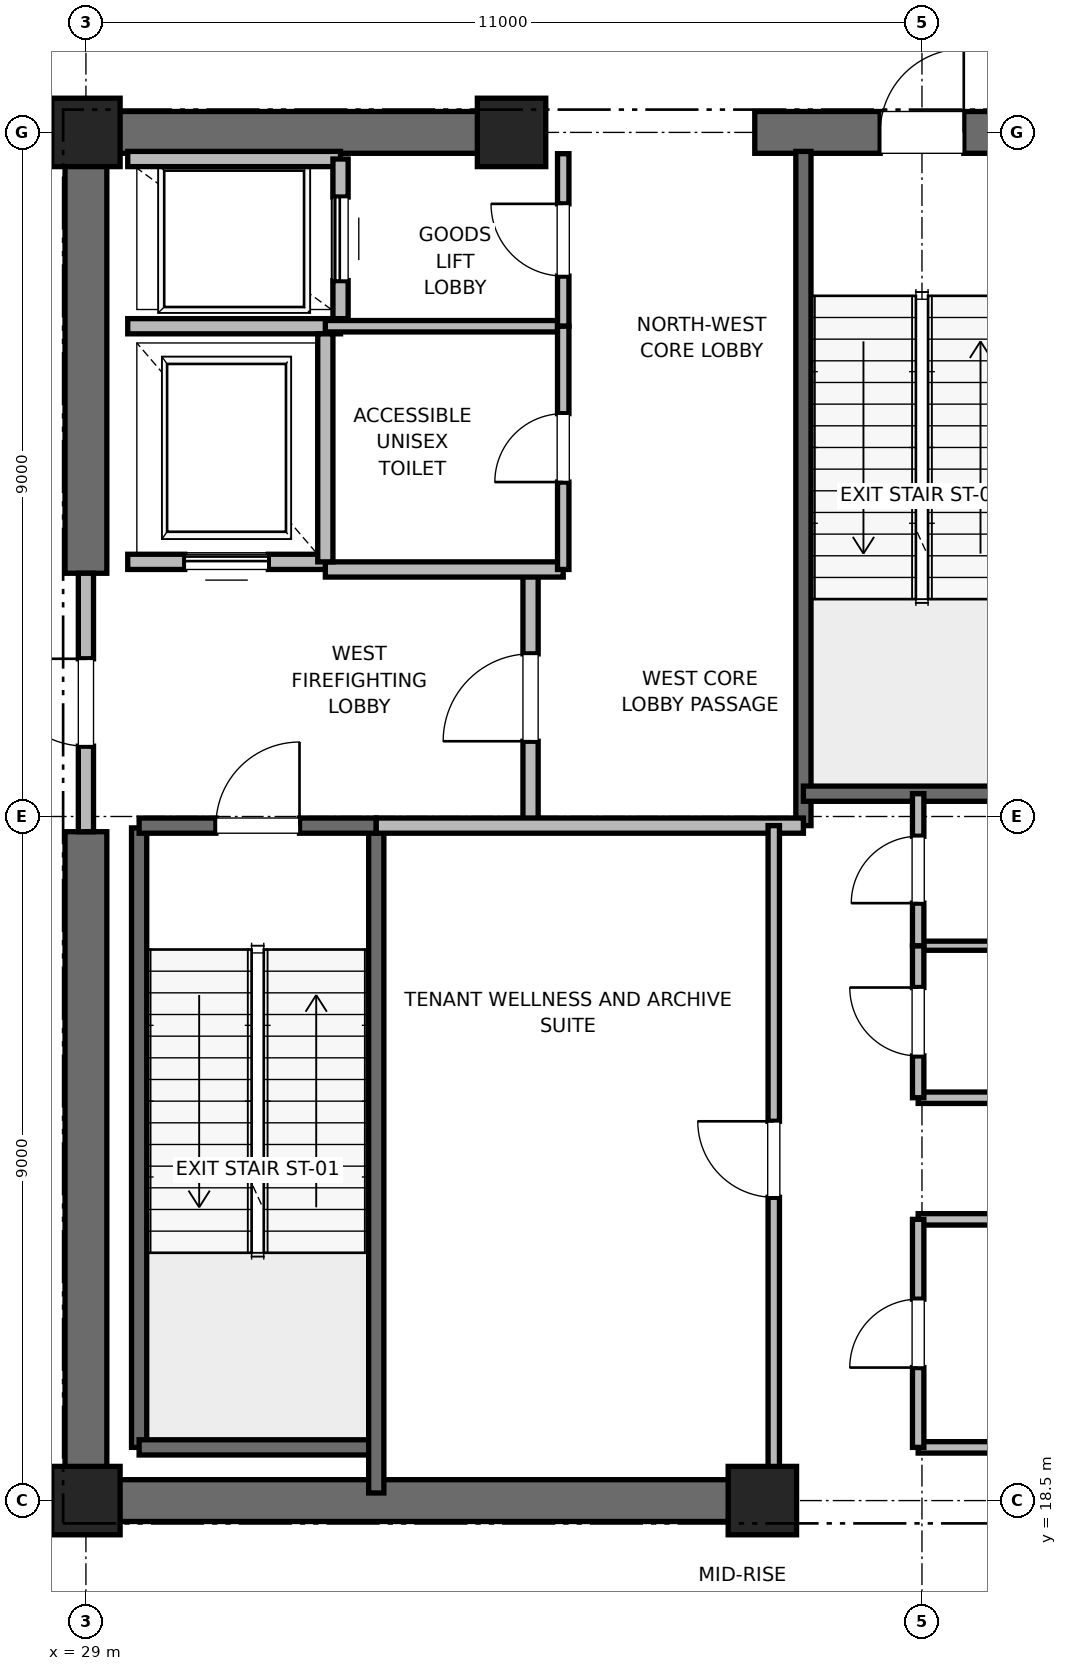
"""IFC4 building model, lengths in metres.
Left out: names, types, materials, properties, quantities, classifications, styles, units other than length and angle.
Written with IfcOpenShell. Run it as: python <this file> out.ifc"""

import sys

from ifc_helpers import new_model, si_unit, direction, frame, frame_2d, origin, origin_2d, place, context, subcontext, project, spatial, rectangle, extrude, element, fill, save


model = new_model("IFC4")
c1 = context("Model", 3, precision=1e-05, world=origin(), true_north=direction((0.0, 1.0)))
c2 = subcontext(c1, "Body", "Model", "MODEL_VIEW")
j1 = project(units=[si_unit("LENGTHUNIT", "METRE"), si_unit("PLANEANGLEUNIT", "RADIAN")], contexts=[c1])
p1 = place(None, origin())
s1 = spatial("IfcSite", under=j1, at=p1, CompositionType="ELEMENT")
p2 = place(p1, origin())
s2 = spatial("IfcBuilding", under=s1, at=p2, CompositionType="ELEMENT")
p3 = place(p2, frame((0.0, 0.0, 200.2)))
s3 = spatial("IfcBuildingStorey", under=s2, at=p3, CompositionType="ELEMENT", Elevation=200.2)
for number, where, z_axis, x_axis in (
    (1, (29.0, 18.5, 0.0), (0.0, 0.0, 1.0), (1.0, 0.0, 0.0)),
    (2, (29.0, 36.5, 0.0), (0.0, 0.0, 1.0), (1.0, 0.0, 0.0)),
    (3, (37.9, 18.5, 0.0), (0.0, 0.0, 1.0), (1.0, 0.0, 0.0)),
    (4, (34.6, 36.5, 0.0), (0.0, 0.0, 1.0), (1.0, 0.0, 0.0)),
):
    element("IfcColumn", number, at=place(p3, frame(where, z_axis=z_axis, x_axis=x_axis)), inside=s3, PredefinedType="PILASTER", context=c2, shape_type="SweptSolid", body=[
        extrude(rectangle(XDim=0.9, YDim=0.9, at=origin_2d()), origin(), (0.0, 0.0, 1.0), 5.0),
    ])
p4 = place(p3, frame((29.0, 18.5, 0.0), z_axis=(0.0, 0.0, 1.0), x_axis=(1.0, 0.0, 0.0)))
e5 = element("IfcWall", 5, at=p4, inside=s3, PredefinedType="SHEAR", context=c2, shape_type="SweptSolid", body=[
    extrude(rectangle(XDim=9.2, YDim=0.55, at=frame_2d((4.6, 0.0))), origin(), (0.0, 0.0, 1.0), 4.775),
])
p5 = place(p3, frame((29.0, 36.5, 0.0), z_axis=(0.0, 0.0, 1.0), x_axis=(1.0, 0.0, 0.0)))
e6 = element("IfcWall", 6, at=p5, inside=s3, PredefinedType="SHEAR", context=c2, shape_type="SweptSolid", body=[
    extrude(rectangle(XDim=5.8, YDim=0.55, at=frame_2d((2.9, 0.0))), origin(), (0.0, 0.0, 1.0), 4.775),
])
p6 = place(p3, frame((37.8, 36.5, 0.0), z_axis=(0.0, 0.0, 1.0), x_axis=(1.0, 0.0, 0.0)))
e7 = element("IfcWall", 7, at=p6, inside=s3, PredefinedType="SHEAR", context=c2, shape_type="SweptSolid", body=[
    extrude(rectangle(XDim=4.4, YDim=0.55, at=frame_2d((2.2, 0.0))), origin(), (0.0, 0.0, 1.0), 4.775),
])
p7 = place(p6, frame((1.65, 0.0, 0.0)))
e8 = element("IfcOpeningElement", 8, at=p7, cuts=e7, PredefinedType="OPENING", context=c2, shape_type="SweptSolid", body=[
    extrude(rectangle(XDim=1.1, YDim=2.15, at=frame_2d((0.55, 1.075))), frame((0.0, 0.275, 0.0), z_axis=(0.0, -1.0, 0.0), x_axis=(1.0, 0.0, 0.0)), (0.0, 0.0, 1.0), 0.55),
])
p8 = place(p3, frame((29.0, 18.5, 0.0), z_axis=(0.0, 0.0, 1.0), x_axis=(0.0, 1.0, 0.0)))
e9 = element("IfcWall", 9, at=p8, inside=s3, PredefinedType="SHEAR", context=c2, shape_type="SweptSolid", body=[
    extrude(rectangle(XDim=8.8, YDim=0.55, at=frame_2d((4.4, 0.0))), origin(), (0.0, 0.0, 1.0), 4.775),
])
p9 = place(p3, frame((29.0, 30.7, 0.0), z_axis=(0.0, 0.0, 1.0), x_axis=(0.0, 1.0, 0.0)))
e10 = element("IfcWall", 10, at=p9, inside=s3, PredefinedType="SHEAR", context=c2, shape_type="SweptSolid", body=[
    extrude(rectangle(XDim=5.8, YDim=0.55, at=frame_2d((2.9, 0.0))), origin(), (0.0, 0.0, 1.0), 4.775),
])
p10 = place(p3, frame((29.7, 19.2, 0.0), z_axis=(0.0, 0.0, 1.0), x_axis=(0.0, 1.0, 0.0)))
e11 = element("IfcWall", 11, at=p10, inside=s3, PredefinedType="SOLIDWALL", context=c2, shape_type="SweptSolid", body=[
    extrude(rectangle(XDim=8.15, YDim=0.2, at=frame_2d((4.075, 0.0))), origin(), (0.0, 0.0, 1.0), 4.775),
])
p11 = place(p3, frame((29.7, 19.2, 0.0), z_axis=(0.0, 0.0, 1.0), x_axis=(1.0, 0.0, 0.0)))
e12 = element("IfcWall", 12, at=p11, inside=s3, PredefinedType="SOLIDWALL", context=c2, shape_type="SweptSolid", body=[
    extrude(rectangle(XDim=3.12, YDim=0.2, at=frame_2d((1.56, 0.0))), origin(), (0.0, 0.0, 1.0), 4.775),
])
p12 = place(p3, frame((32.82, 18.6, 0.0), z_axis=(0.0, 0.0, 1.0), x_axis=(0.0, 1.0, 0.0)))
e13 = element("IfcWall", 13, at=p12, inside=s3, PredefinedType="SOLIDWALL", context=c2, shape_type="SweptSolid", body=[
    extrude(rectangle(XDim=8.78, YDim=0.2, at=frame_2d((4.39, 0.0))), origin(), (0.0, 0.0, 1.0), 4.775),
])
p13 = place(p3, frame((29.7, 27.38, 0.0), z_axis=(0.0, 0.0, 1.0), x_axis=(1.0, 0.0, 0.0)))
e14 = element("IfcWall", 14, at=p13, inside=s3, PredefinedType="SOLIDWALL", context=c2, shape_type="SweptSolid", body=[
    extrude(rectangle(XDim=3.12, YDim=0.2, at=frame_2d((1.56, 0.0))), origin(), (0.0, 0.0, 1.0), 4.775),
])
p14 = place(p13, frame((1.01, 0.0, 0.0)))
e15 = element("IfcOpeningElement", 15, at=p14, cuts=e14, PredefinedType="OPENING", context=c2, shape_type="SweptSolid", body=[
    extrude(rectangle(XDim=1.1, YDim=2.15, at=frame_2d((0.55, 1.075))), frame((0.0, 0.1, 0.0), z_axis=(0.0, -1.0, 0.0), x_axis=(1.0, 0.0, 0.0)), (0.0, 0.0, 1.0), 0.2),
])
p15 = place(p3, frame((38.44, 27.38, 0.0), z_axis=(0.0, 0.0, 1.0), x_axis=(0.0, 1.0, 0.0)))
e16 = element("IfcWall", 16, at=p15, inside=s3, PredefinedType="SOLIDWALL", context=c2, shape_type="SweptSolid", body=[
    extrude(rectangle(XDim=8.87, YDim=0.2, at=frame_2d((4.435, 0.0))), origin(), (0.0, 0.0, 1.0), 4.775),
])
p16 = place(p3, frame((38.44, 27.8, 0.0), z_axis=(0.0, 0.0, 1.0), x_axis=(1.0, 0.0, 0.0)))
e17 = element("IfcWall", 17, at=p16, inside=s3, PredefinedType="SOLIDWALL", context=c2, shape_type="SweptSolid", body=[
    extrude(rectangle(XDim=3.32, YDim=0.2, at=frame_2d((1.66, 0.0))), origin(), (0.0, 0.0, 1.0), 4.775),
])
p17 = place(p3, frame((34.85, 27.38, 0.0), z_axis=(0.0, 0.0, 1.0), x_axis=(0.0, 1.0, 0.0)))
e18 = element("IfcWall", 18, at=p17, inside=s3, PredefinedType="PARTITIONING", context=c2, shape_type="SweptSolid", body=[
    extrude(rectangle(XDim=3.37, YDim=0.2, at=frame_2d((1.685, 0.0))), origin(), (0.0, 0.0, 1.0), 4.775),
])
p18 = place(p17, frame((1.11, 0.0, 0.0)))
e19 = element("IfcOpeningElement", 19, at=p18, cuts=e18, PredefinedType="OPENING", context=c2, shape_type="SweptSolid", body=[
    extrude(rectangle(XDim=1.15, YDim=2.2, at=frame_2d((0.575, 1.1))), frame((0.0, 0.1, 0.0), z_axis=(0.0, -1.0, 0.0), x_axis=(1.0, 0.0, 0.0)), (0.0, 0.0, 1.0), 0.2),
])
p19 = place(p3, frame((29.0, 27.3, 0.0), z_axis=(0.0, 0.0, 1.0), x_axis=(0.0, 1.0, 0.0)))
e20 = element("IfcWall", 20, at=p19, inside=s3, PredefinedType="PARTITIONING", context=c2, shape_type="SweptSolid", body=[
    extrude(rectangle(XDim=3.4, YDim=0.2, at=frame_2d((1.7, 0.0))), origin(), (0.0, 0.0, 1.0), 3.755),
])
p20 = place(p19, frame((1.125, 0.0, 0.0)))
e21 = element("IfcOpeningElement", 21, at=p20, cuts=e20, PredefinedType="OPENING", context=c2, shape_type="SweptSolid", body=[
    extrude(rectangle(XDim=1.15, YDim=2.2, at=frame_2d((0.575, 1.1))), frame((0.0, 0.1, 0.0), z_axis=(0.0, -1.0, 0.0), x_axis=(1.0, 0.0, 0.0)), (0.0, 0.0, 1.0), 0.2),
])
p21 = place(p3, frame((32.82, 27.38, 0.0), z_axis=(0.0, 0.0, 1.0), x_axis=(1.0, 0.0, 0.0)))
e22 = element("IfcWall", 22, at=p21, inside=s3, PredefinedType="PARTITIONING", context=c2, shape_type="SweptSolid", body=[
    extrude(rectangle(XDim=5.62, YDim=0.2, at=frame_2d((2.81, 0.0))), origin(), (0.0, 0.0, 1.0), 4.775),
])
p22 = place(p3, frame((32.15, 30.75, 0.0), z_axis=(0.0, 0.0, 1.0), x_axis=(1.0, 0.0, 0.0)))
e23 = element("IfcWall", 23, at=p22, inside=s3, PredefinedType="PARTITIONING", context=c2, shape_type="SweptSolid", body=[
    extrude(rectangle(XDim=3.13, YDim=0.2, at=frame_2d((1.565, 0.0))), origin(), (0.0, 0.0, 1.0), 4.775),
])
p23 = place(p3, frame((29.55, 30.85, 0.0), z_axis=(0.0, 0.0, 1.0), x_axis=(1.0, 0.0, 0.0)))
e24 = element("IfcWall", 24, at=p23, inside=s3, PredefinedType="SOLIDWALL", context=c2, shape_type="SweptSolid", body=[
    extrude(rectangle(XDim=2.6, YDim=0.2, at=frame_2d((1.3, 0.0))), origin(), (0.0, 0.0, 1.0), 3.755),
])
p24 = place(p23, frame((0.75, 0.0, 0.0)))
e25 = element("IfcOpeningElement", 25, at=p24, cuts=e24, PredefinedType="OPENING", context=c2, shape_type="SweptSolid", body=[
    extrude(rectangle(XDim=1.1, YDim=2.2, at=frame_2d((0.55, 1.1))), frame((0.0, 0.1, 0.0), z_axis=(0.0, -1.0, 0.0), x_axis=(1.0, 0.0, 0.0)), (0.0, 0.0, 1.0), 0.2),
])
p25 = place(p3, frame((29.55, 33.95, 0.0), z_axis=(0.0, 0.0, 1.0), x_axis=(1.0, 0.0, 0.0)))
e26 = element("IfcWall", 26, at=p25, inside=s3, PredefinedType="SOLIDWALL", context=c2, shape_type="SweptSolid", body=[
    extrude(rectangle(XDim=2.8, YDim=0.2, at=frame_2d((1.4, 0.0))), origin(), (0.0, 0.0, 1.0), 4.775),
])
p26 = place(p3, frame((32.15, 30.85, 0.0), z_axis=(0.0, 0.0, 1.0), x_axis=(0.0, 1.0, 0.0)))
e27 = element("IfcWall", 27, at=p26, inside=s3, PredefinedType="SOLIDWALL", context=c2, shape_type="SweptSolid", body=[
    extrude(rectangle(XDim=3.0, YDim=0.2, at=frame_2d((1.5, 0.0))), origin(), (0.0, 0.0, 1.0), 4.775),
])
p27 = place(p3, frame((32.35, 36.15, 0.0), z_axis=(0.0, 0.0, 1.0), x_axis=(-1.0, 0.0, 0.0)))
e28 = element("IfcWall", 28, at=p27, inside=s3, PredefinedType="SOLIDWALL", context=c2, shape_type="SweptSolid", body=[
    extrude(rectangle(XDim=2.8, YDim=0.2, at=frame_2d((1.4, 0.0))), origin(), (0.0, 0.0, 1.0), 4.062),
])
p28 = place(p3, frame((32.35, 34.05, 0.0), z_axis=(0.0, 0.0, 1.0), x_axis=(0.0, 1.0, 0.0)))
e29 = element("IfcWall", 29, at=p28, inside=s3, PredefinedType="SOLIDWALL", context=c2, shape_type="SweptSolid", body=[
    extrude(rectangle(XDim=2.1, YDim=0.2, at=frame_2d((1.05, 0.0))), origin(), (0.0, 0.0, 1.0), 4.775),
])
p29 = place(p28, frame((0.5, 0.0, 0.0)))
e30 = element("IfcOpeningElement", 30, at=p29, cuts=e29, PredefinedType="OPENING", context=c2, shape_type="SweptSolid", body=[
    extrude(rectangle(XDim=1.1, YDim=2.2, at=frame_2d((0.55, 1.1))), frame((0.0, 0.1, 0.0), z_axis=(0.0, -1.0, 0.0), x_axis=(1.0, 0.0, 0.0)), (0.0, 0.0, 1.0), 0.2),
])
for number, where, z_axis, x_axis in (
    (31, (39.95, 19.2, 0.0), (0.0, 0.0, 1.0), (1.0, 0.0, 0.0)),
    (32, (39.95, 22.2, 0.0), (0.0, 0.0, 1.0), (1.0, 0.0, 0.0)),
    (33, (39.95, 23.8, 0.0), (0.0, 0.0, 1.0), (1.0, 0.0, 0.0)),
):
    element("IfcWall", number, at=place(p3, frame(where, z_axis=z_axis, x_axis=x_axis)), inside=s3, PredefinedType="PARTITIONING", context=c2, shape_type="SweptSolid", body=[
        extrude(rectangle(XDim=1.81, YDim=0.15, at=frame_2d((0.905, 0.0))), origin(), (0.0, 0.0, 1.0), 2.85),
    ])
p30 = place(p3, frame((39.95, 25.8, 0.0), z_axis=(0.0, 0.0, 1.0), x_axis=(1.0, 0.0, 0.0)))
e34 = element("IfcWall", 34, at=p30, inside=s3, PredefinedType="PARTITIONING", context=c2, shape_type="SweptSolid", body=[
    extrude(rectangle(XDim=1.81, YDim=0.12, at=frame_2d((0.905, 0.0))), origin(), (0.0, 0.0, 1.0), 2.85),
])
p31 = place(p3, frame((39.95, 19.2, 0.0), z_axis=(0.0, 0.0, 1.0), x_axis=(0.0, 1.0, 0.0)))
e35 = element("IfcWall", 35, at=p31, inside=s3, PredefinedType="PARTITIONING", context=c2, shape_type="SweptSolid", body=[
    extrude(rectangle(XDim=3.0, YDim=0.15, at=frame_2d((1.5, 0.0))), origin(), (0.0, 0.0, 1.0), 2.85),
])
p32 = place(p31, frame((1.05, 0.0, 0.0)))
e36 = element("IfcOpeningElement", 36, at=p32, cuts=e35, PredefinedType="OPENING", context=c2, shape_type="SweptSolid", body=[
    extrude(rectangle(XDim=0.9, YDim=2.1, at=frame_2d((0.45, 1.05))), frame((0.0, 0.075, 0.0), z_axis=(0.0, -1.0, 0.0), x_axis=(1.0, 0.0, 0.0)), (0.0, 0.0, 1.0), 0.15),
])
p33 = place(p3, frame((39.95, 23.8, 0.0), z_axis=(0.0, 0.0, 1.0), x_axis=(0.0, 1.0, 0.0)))
e37 = element("IfcWall", 37, at=p33, inside=s3, PredefinedType="PARTITIONING", context=c2, shape_type="SweptSolid", body=[
    extrude(rectangle(XDim=2.0, YDim=0.15, at=frame_2d((1.0, 0.0))), origin(), (0.0, 0.0, 1.0), 2.85),
])
p34 = place(p33, frame((0.55, 0.0, 0.0)))
e38 = element("IfcOpeningElement", 38, at=p34, cuts=e37, PredefinedType="OPENING", context=c2, shape_type="SweptSolid", body=[
    extrude(rectangle(XDim=0.9, YDim=2.1, at=frame_2d((0.45, 1.05))), frame((0.0, 0.075, 0.0), z_axis=(0.0, -1.0, 0.0), x_axis=(1.0, 0.0, 0.0)), (0.0, 0.0, 1.0), 0.15),
])
p35 = place(p3, frame((39.95, 25.8, 0.0), z_axis=(0.0, 0.0, 1.0), x_axis=(0.0, 1.0, 0.0)))
e39 = element("IfcWall", 39, at=p35, inside=s3, PredefinedType="PARTITIONING", context=c2, shape_type="SweptSolid", body=[
    extrude(rectangle(XDim=2.0, YDim=0.15, at=frame_2d((1.0, 0.0))), origin(), (0.0, 0.0, 1.0), 2.85),
])
p36 = place(p35, frame((0.56, 0.0, 0.0)))
e40 = element("IfcOpeningElement", 40, at=p36, cuts=e39, PredefinedType="OPENING", context=c2, shape_type="SweptSolid", body=[
    extrude(rectangle(XDim=0.88, YDim=2.1, at=frame_2d((0.44, 1.05))), frame((0.0, 0.075, 0.0), z_axis=(0.0, -1.0, 0.0), x_axis=(1.0, 0.0, 0.0)), (0.0, 0.0, 1.0), 0.15),
])
p37 = place(p3, frame((32.15, 33.95, 0.0), z_axis=(0.0, 0.0, 1.0), x_axis=(1.0, 0.0, 0.0)))
e41 = element("IfcWall", 41, at=p37, inside=s3, PredefinedType="PARTITIONING", context=c2, shape_type="SweptSolid", body=[
    extrude(rectangle(XDim=3.13, YDim=0.15, at=frame_2d((1.565, 0.0))), origin(), (0.0, 0.0, 1.0), 2.85),
])
p38 = place(p3, frame((35.28, 33.95, 0.0), z_axis=(0.0, 0.0, 1.0), x_axis=(0.0, 1.0, 0.0)))
e42 = element("IfcWall", 42, at=p38, inside=s3, PredefinedType="PARTITIONING", context=c2, shape_type="SweptSolid", body=[
    extrude(rectangle(XDim=2.27, YDim=0.15, at=frame_2d((1.135, 0.0))), origin(), (0.0, 0.0, 1.0), 2.85),
])
p39 = place(p38, frame((0.66, 0.0, 0.0)))
e43 = element("IfcOpeningElement", 43, at=p39, cuts=e42, PredefinedType="OPENING", context=c2, shape_type="SweptSolid", body=[
    extrude(rectangle(XDim=0.95, YDim=2.15, at=frame_2d((0.475, 1.075))), frame((0.0, 0.075, 0.0), z_axis=(0.0, -1.0, 0.0), x_axis=(1.0, 0.0, 0.0)), (0.0, 0.0, 1.0), 0.15),
])
p40 = place(p3, frame((35.28, 30.75, 0.0), z_axis=(0.0, 0.0, 1.0), x_axis=(0.0, 1.0, 0.0)))
e44 = element("IfcWall", 44, at=p40, inside=s3, PredefinedType="PARTITIONING", context=c2, shape_type="SweptSolid", body=[
    extrude(rectangle(XDim=3.2, YDim=0.15, at=frame_2d((1.6, 0.0))), origin(), (0.0, 0.0, 1.0), 2.85),
])
p41 = place(p40, frame((1.15, 0.0, 0.0)))
e45 = element("IfcOpeningElement", 45, at=p41, cuts=e44, PredefinedType="OPENING", context=c2, shape_type="SweptSolid", body=[
    extrude(rectangle(XDim=0.9, YDim=2.1, at=frame_2d((0.45, 1.05))), frame((0.0, 0.075, 0.0), z_axis=(0.0, -1.0, 0.0), x_axis=(1.0, 0.0, 0.0)), (0.0, 0.0, 1.0), 0.15),
])
p42 = place(p3, frame((38.05, 18.6, 0.0), z_axis=(0.0, 0.0, 1.0), x_axis=(0.0, 1.0, 0.0)))
e46 = element("IfcWall", 46, at=p42, inside=s3, PredefinedType="PARTITIONING", context=c2, shape_type="SweptSolid", body=[
    extrude(rectangle(XDim=8.78, YDim=0.15, at=frame_2d((4.39, 0.0))), origin(), (0.0, 0.0, 1.0), 2.85),
])
p43 = place(p42, frame((3.89, 0.0, 0.0)))
e47 = element("IfcOpeningElement", 47, at=p43, cuts=e46, PredefinedType="OPENING", context=c2, shape_type="SweptSolid", body=[
    extrude(rectangle(XDim=1.0, YDim=2.15, at=frame_2d((0.5, 1.075))), frame((0.0, 0.075, 0.0), z_axis=(0.0, -1.0, 0.0), x_axis=(1.0, 0.0, 0.0)), (0.0, 0.0, 1.0), 0.15),
])
p44 = place(p14, origin())
e48 = element("IfcDoor", 48, at=p44, inside=s3, OperationType="SINGLE_SWING_RIGHT", PredefinedType="DOOR", context=c2, shape_type="SweptSolid", body=[
    extrude(rectangle(XDim=1.1, YDim=2.15, at=frame_2d((0.55, 1.075))), frame((0.0, 0.025, 0.0), z_axis=(0.0, -1.0, 0.0), x_axis=(1.0, 0.0, 0.0)), (0.0, 0.0, 1.0), 0.05),
])
fill(e15, e48)
p45 = place(p7, origin())
e49 = element("IfcDoor", 49, at=p45, inside=s3, OperationType="SINGLE_SWING_RIGHT", PredefinedType="DOOR", context=c2, shape_type="SweptSolid", body=[
    extrude(rectangle(XDim=1.1, YDim=2.15, at=frame_2d((0.55, 1.075))), frame((0.0, 0.025, 0.0), z_axis=(0.0, -1.0, 0.0), x_axis=(1.0, 0.0, 0.0)), (0.0, 0.0, 1.0), 0.05),
])
fill(e8, e49)
p46 = place(p18, origin())
e50 = element("IfcDoor", 50, at=p46, inside=s3, OperationType="SINGLE_SWING_LEFT", PredefinedType="DOOR", context=c2, shape_type="SweptSolid", body=[
    extrude(rectangle(XDim=1.15, YDim=2.2, at=frame_2d((0.575, 1.1))), frame((0.0, 0.025, 0.0), z_axis=(0.0, -1.0, 0.0), x_axis=(1.0, 0.0, 0.0)), (0.0, 0.0, 1.0), 0.05),
])
fill(e19, e50)
p47 = place(p20, origin())
e51 = element("IfcDoor", 51, at=p47, inside=s3, OperationType="SINGLE_SWING_RIGHT", PredefinedType="DOOR", context=c2, shape_type="SweptSolid", body=[
    extrude(rectangle(XDim=1.15, YDim=2.2, at=frame_2d((0.575, 1.1))), frame((0.0, 0.025, 0.0), z_axis=(0.0, -1.0, 0.0), x_axis=(1.0, 0.0, 0.0)), (0.0, 0.0, 1.0), 0.05),
])
fill(e21, e51)
p48 = place(p24, origin())
e52 = element("IfcDoor", 52, at=p48, inside=s3, OperationType="SLIDING_TO_RIGHT", PredefinedType="DOOR", context=c2, shape_type="SweptSolid", body=[
    extrude(rectangle(XDim=1.1, YDim=2.2, at=frame_2d((0.55, 1.1))), frame((0.0, 0.025, 0.0), z_axis=(0.0, -1.0, 0.0), x_axis=(1.0, 0.0, 0.0)), (0.0, 0.0, 1.0), 0.05),
])
fill(e25, e52)
p49 = place(p29, origin())
e53 = element("IfcDoor", 53, at=p49, inside=s3, OperationType="SLIDING_TO_RIGHT", PredefinedType="DOOR", context=c2, shape_type="SweptSolid", body=[
    extrude(rectangle(XDim=1.1, YDim=2.2, at=frame_2d((0.55, 1.1))), frame((0.0, 0.025, 0.0), z_axis=(0.0, -1.0, 0.0), x_axis=(1.0, 0.0, 0.0)), (0.0, 0.0, 1.0), 0.05),
])
fill(e30, e53)
p50 = place(p32, origin())
e54 = element("IfcDoor", 54, at=p50, inside=s3, OperationType="SINGLE_SWING_LEFT", PredefinedType="DOOR", context=c2, shape_type="SweptSolid", body=[
    extrude(rectangle(XDim=0.9, YDim=2.1, at=frame_2d((0.45, 1.05))), frame((0.0, 0.025, 0.0), z_axis=(0.0, -1.0, 0.0), x_axis=(1.0, 0.0, 0.0)), (0.0, 0.0, 1.0), 0.05),
])
fill(e36, e54)
p51 = place(p34, origin())
e55 = element("IfcDoor", 55, at=p51, inside=s3, OperationType="SINGLE_SWING_RIGHT", PredefinedType="DOOR", context=c2, shape_type="SweptSolid", body=[
    extrude(rectangle(XDim=0.9, YDim=2.1, at=frame_2d((0.45, 1.05))), frame((0.0, 0.025, 0.0), z_axis=(0.0, -1.0, 0.0), x_axis=(1.0, 0.0, 0.0)), (0.0, 0.0, 1.0), 0.05),
])
fill(e38, e55)
p52 = place(p36, origin())
e56 = element("IfcDoor", 56, at=p52, inside=s3, OperationType="SINGLE_SWING_LEFT", PredefinedType="DOOR", context=c2, shape_type="SweptSolid", body=[
    extrude(rectangle(XDim=0.88, YDim=2.1, at=frame_2d((0.44, 1.05))), frame((0.0, 0.025, 0.0), z_axis=(0.0, -1.0, 0.0), x_axis=(1.0, 0.0, 0.0)), (0.0, 0.0, 1.0), 0.05),
])
fill(e40, e56)
p53 = place(p39, origin())
e57 = element("IfcDoor", 57, at=p53, inside=s3, OperationType="SINGLE_SWING_RIGHT", PredefinedType="DOOR", context=c2, shape_type="SweptSolid", body=[
    extrude(rectangle(XDim=0.95, YDim=2.15, at=frame_2d((0.475, 1.075))), frame((0.0, 0.025, 0.0), z_axis=(0.0, -1.0, 0.0), x_axis=(1.0, 0.0, 0.0)), (0.0, 0.0, 1.0), 0.05),
])
fill(e43, e57)
p54 = place(p41, origin())
e58 = element("IfcDoor", 58, at=p54, inside=s3, OperationType="SINGLE_SWING_LEFT", PredefinedType="DOOR", context=c2, shape_type="SweptSolid", body=[
    extrude(rectangle(XDim=0.9, YDim=2.1, at=frame_2d((0.45, 1.05))), frame((0.0, 0.025, 0.0), z_axis=(0.0, -1.0, 0.0), x_axis=(1.0, 0.0, 0.0)), (0.0, 0.0, 1.0), 0.05),
])
fill(e45, e58)
p55 = place(p43, origin())
e59 = element("IfcDoor", 59, at=p55, inside=s3, OperationType="SINGLE_SWING_RIGHT", PredefinedType="DOOR", context=c2, shape_type="SweptSolid", body=[
    extrude(rectangle(XDim=1.0, YDim=2.15, at=frame_2d((0.5, 1.075))), frame((0.0, 0.025, 0.0), z_axis=(0.0, -1.0, 0.0), x_axis=(1.0, 0.0, 0.0)), (0.0, 0.0, 1.0), 0.05),
])
fill(e47, e59)
save(model, sys.argv[1])
